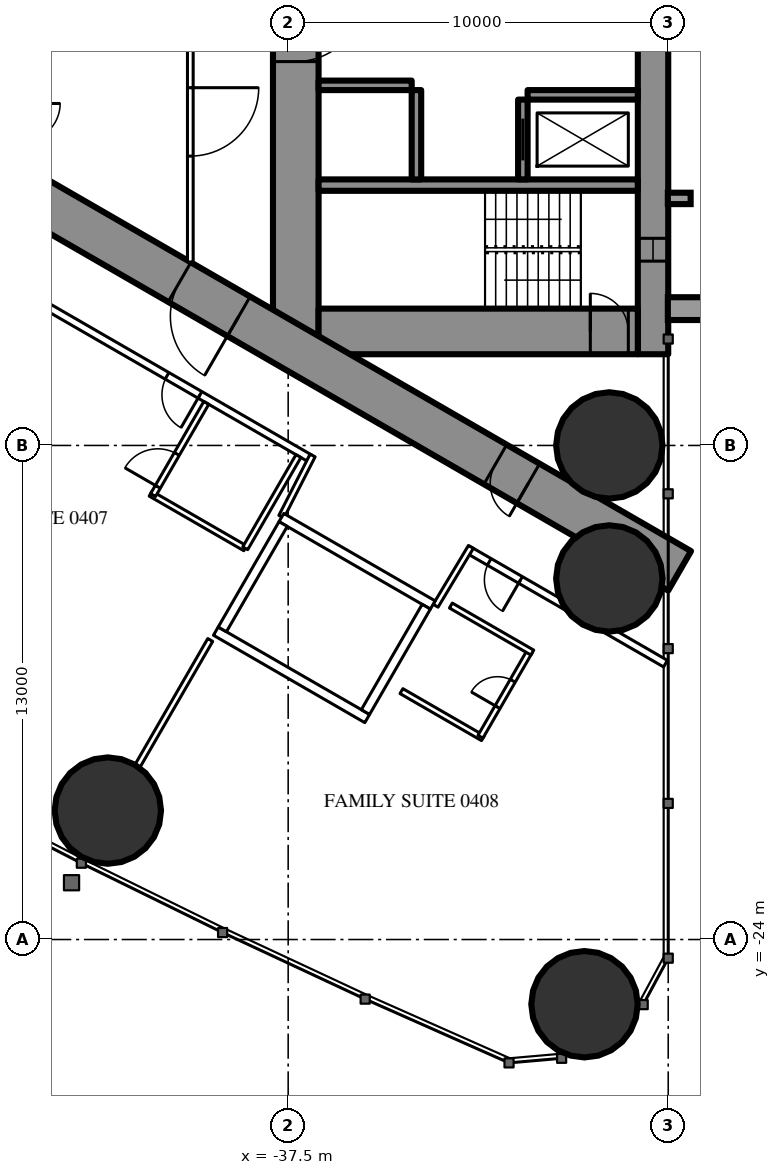
"""IFC4 building model, lengths in metres.
Left out: names, types, materials, properties, quantities, classifications, styles, units other than length and angle.
Written with IfcOpenShell. Run it as: python <this file> out.ifc"""

import sys

from ifc_helpers import new_model, si_unit, direction, frame, frame_2d, origin, origin_2d, place, context, subcontext, project, spatial, rectangle, hollow_circle, extrude, element, fill, save


model = new_model("IFC4")
c1 = context("Model", 3, precision=1e-05, world=origin(), true_north=direction((0.0, 1.0)))
c2 = subcontext(c1, "Body", "Model", "MODEL_VIEW")
j1 = project(units=[si_unit("LENGTHUNIT", "METRE"), si_unit("PLANEANGLEUNIT", "RADIAN")], contexts=[c1])
p1 = place(None, origin())
s1 = spatial("IfcSite", under=j1, at=p1, CompositionType="ELEMENT")
p2 = place(p1, origin())
s2 = spatial("IfcBuilding", under=s1, at=p2, CompositionType="ELEMENT")
p3 = place(p2, frame((0.0, 0.0, 21.5)))
s3 = spatial("IfcBuildingStorey", under=s2, at=p3, CompositionType="ELEMENT", Elevation=21.5)
for number, where, z_axis, x_axis in (
    (1, (-29.703, -25.703, 0.0), (0.0, 0.0, 1.0), (1.0, 0.0, 0.0)),
    (2, (-29.05, -11.0, 0.0), (0.0, 0.0, 1.0), (1.0, 0.0, 0.0)),
    (3, (-29.05, -14.5, 0.0), (0.0, 0.0, 1.0), (1.0, 0.0, 0.0)),
    (4, (-42.245, -20.607, 0.0), (0.0, 0.0, 1.0), (1.0, 0.0, 0.0)),
):
    element("IfcColumn", number, at=place(p3, frame(where, z_axis=z_axis, x_axis=x_axis)), inside=s3, PredefinedType="COLUMN", context=c2, shape_type="SweptSolid", body=[
        extrude(hollow_circle(Radius=1.4, WallThickness=0.12, at=origin_2d()), origin(), (0.0, 0.0, 1.0), 3.5),
    ])
p4 = place(p3, frame((-27.9, 8.6, 0.0), z_axis=(0.0, 0.0, 1.0), x_axis=(0.0, -1.0, 0.0)))
e5 = element("IfcWall", 5, at=p4, inside=s3, PredefinedType="SHEAR", context=c2, shape_type="SweptSolid", body=[
    extrude(rectangle(XDim=17.2, YDim=0.8, at=frame_2d((8.6, 0.0))), origin(), (0.0, 0.0, 1.0), 3.5),
])
p5 = place(p4, frame((2.45, 0.0, 0.6)))
e6 = element("IfcOpeningElement", 6, at=p5, cuts=e5, PredefinedType="OPENING", context=c2, shape_type="SweptSolid", body=[
    extrude(rectangle(XDim=0.6, YDim=2.1, at=frame_2d((0.3, 1.05))), frame((0.0, 0.41, 0.0), z_axis=(0.0, -1.0, 0.0), x_axis=(1.0, 0.0, 0.0)), (0.0, 0.0, 1.0), 0.82),
])
p6 = place(p4, frame((14.15, 0.0, 0.6)))
e7 = element("IfcOpeningElement", 7, at=p6, cuts=e5, PredefinedType="OPENING", context=c2, shape_type="SweptSolid", body=[
    extrude(rectangle(XDim=0.6, YDim=2.1, at=frame_2d((0.3, 1.05))), frame((0.0, 0.41, 0.0), z_axis=(0.0, -1.0, 0.0), x_axis=(1.0, 0.0, 0.0)), (0.0, 0.0, 1.0), 0.82),
])
p7 = place(p3, frame((-37.3, 8.6, 0.0), z_axis=(0.0, 0.0, 1.0), x_axis=(0.0, -1.0, 0.0)))
e8 = element("IfcWall", 8, at=p7, inside=s3, PredefinedType="SHEAR", context=c2, shape_type="SweptSolid", body=[
    extrude(rectangle(XDim=17.2, YDim=1.2, at=frame_2d((8.6, 0.0))), origin(), (0.0, 0.0, 1.0), 3.5),
])
p8 = place(p7, frame((7.7, 0.0, 0.0)))
e9 = element("IfcOpeningElement", 9, at=p8, cuts=e8, PredefinedType="OPENING", context=c2, shape_type="SweptSolid", body=[
    extrude(rectangle(XDim=1.8, YDim=2.2, at=frame_2d((0.9, 1.1))), frame((0.0, 0.61, 0.0), z_axis=(0.0, -1.0, 0.0), x_axis=(1.0, 0.0, 0.0)), (0.0, 0.0, 1.0), 1.22),
])
p9 = place(p3, frame((-28.3, -8.0, 0.0), z_axis=(0.0, 0.0, 1.0), x_axis=(-1.0, 0.0, 0.0)))
e10 = element("IfcWall", 10, at=p9, inside=s3, PredefinedType="SHEAR", context=c2, shape_type="SweptSolid", body=[
    extrude(rectangle(XDim=8.4, YDim=1.2, at=frame_2d((4.2, 0.0))), origin(), (0.0, 0.0, 1.0), 3.5),
])
p10 = place(p9, frame((0.25, 0.0, 0.0)))
e11 = element("IfcOpeningElement", 11, at=p10, cuts=e10, PredefinedType="OPENING", context=c2, shape_type="SweptSolid", body=[
    extrude(rectangle(XDim=1.0, YDim=2.2, at=frame_2d((0.5, 1.1))), frame((0.0, 0.61, 0.0), z_axis=(0.0, -1.0, 0.0), x_axis=(1.0, 0.0, 0.0)), (0.0, 0.0, 1.0), 1.22),
])
p11 = place(p3, frame((-28.3, -4.15, 0.0), z_axis=(0.0, 0.0, 1.0), x_axis=(-1.0, 0.0, 0.0)))
e12 = element("IfcWall", 12, at=p11, inside=s3, PredefinedType="SHEAR", context=c2, shape_type="SweptSolid", body=[
    extrude(rectangle(XDim=8.4, YDim=0.3, at=frame_2d((4.2, 0.0))), origin(), (0.0, 0.0, 1.0), 3.5),
])
p12 = place(p3, frame((-31.325, -1.9, 0.0), z_axis=(0.0, 0.0, 1.0), x_axis=(0.0, -1.0, 0.0)))
e13 = element("IfcWall", 13, at=p12, inside=s3, PredefinedType="SHEAR", context=c2, shape_type="SweptSolid", body=[
    extrude(rectangle(XDim=2.1, YDim=0.25, at=frame_2d((1.05, 0.0))), origin(), (0.0, 0.0, 1.0), 3.5),
])
p13 = place(p12, frame((0.5, 0.0, 0.0)))
e14 = element("IfcOpeningElement", 14, at=p13, cuts=e13, PredefinedType="OPENING", context=c2, shape_type="SweptSolid", body=[
    extrude(rectangle(XDim=1.1, YDim=2.2, at=frame_2d((0.55, 1.1))), frame((0.0, 0.135, 0.0), z_axis=(0.0, -1.0, 0.0), x_axis=(1.0, 0.0, 0.0)), (0.0, 0.0, 1.0), 0.27),
])
p14 = place(p3, frame((-34.125, -1.65, 0.0), z_axis=(0.0, 0.0, 1.0), x_axis=(0.0, -1.0, 0.0)))
e15 = element("IfcWall", 15, at=p14, inside=s3, PredefinedType="SHEAR", context=c2, shape_type="SweptSolid", body=[
    extrude(rectangle(XDim=2.35, YDim=0.25, at=frame_2d((1.175, 0.0))), origin(), (0.0, 0.0, 1.0), 3.5),
])
p15 = place(p3, frame((-28.3, -1.775, 0.0), z_axis=(0.0, 0.0, 1.0), x_axis=(-1.0, 0.0, 0.0)))
e16 = element("IfcWall", 16, at=p15, inside=s3, PredefinedType="SHEAR", context=c2, shape_type="SweptSolid", body=[
    extrude(rectangle(XDim=2.9, YDim=0.25, at=frame_2d((1.45, 0.0))), origin(), (0.0, 0.0, 1.0), 3.5),
])
p16 = place(p3, frame((-34.25, -1.525, 0.0), z_axis=(0.0, 0.0, 1.0), x_axis=(-1.0, 0.0, 0.0)))
e17 = element("IfcWall", 17, at=p16, inside=s3, PredefinedType="SHEAR", context=c2, shape_type="SweptSolid", body=[
    extrude(rectangle(XDim=2.45, YDim=0.25, at=frame_2d((1.225, 0.0))), origin(), (0.0, 0.0, 1.0), 3.5),
])
p17 = place(p3, frame((-27.2, 14.3, 0.0), z_axis=(0.0, 0.0, 1.0), x_axis=(-0.866026593062, -0.499997940104, 0.0)))
e18 = element("IfcWall", 18, at=p17, inside=s3, PredefinedType="SHEAR", context=c2, shape_type="SweptSolid", body=[
    extrude(rectangle(XDim=28.946, YDim=1.2, at=frame_2d((14.473, 0.0))), origin(), (0.0, 0.0, 1.0), 3.5),
])
p18 = place(p17, frame((4.6, 0.0, 0.0)))
e19 = element("IfcOpeningElement", 19, at=p18, cuts=e18, PredefinedType="OPENING", context=c2, shape_type="SweptSolid", body=[
    extrude(rectangle(XDim=1.0, YDim=2.2, at=frame_2d((0.5, 1.1))), frame((0.0, 0.61, 0.0), z_axis=(0.0, -1.0, 0.0), x_axis=(1.0, 0.0, 0.0)), (0.0, 0.0, 1.0), 1.22),
])
p19 = place(p17, frame((13.395, 0.0, 0.0)))
e20 = element("IfcOpeningElement", 20, at=p19, cuts=e18, PredefinedType="OPENING", context=c2, shape_type="SweptSolid", body=[
    extrude(rectangle(XDim=1.8, YDim=2.2, at=frame_2d((0.9, 1.1))), frame((0.0, 0.61, 0.0), z_axis=(0.0, -1.0, 0.0), x_axis=(1.0, 0.0, 0.0)), (0.0, 0.0, 1.0), 1.22),
])
p20 = place(p3, frame((-27.2, -14.3, 0.0), z_axis=(0.0, 0.0, 1.0), x_axis=(-0.866024021859, 0.500002393557, 0.0)))
e21 = element("IfcWall", 21, at=p20, inside=s3, PredefinedType="SHEAR", context=c2, shape_type="SweptSolid", body=[
    extrude(rectangle(XDim=27.907, YDim=1.2, at=frame_2d((13.954, 0.0))), origin(), (0.0, 0.0, 1.0), 3.5),
])
p21 = place(p20, frame((4.6, 0.0, 0.0)))
e22 = element("IfcOpeningElement", 22, at=p21, cuts=e21, PredefinedType="OPENING", context=c2, shape_type="SweptSolid", body=[
    extrude(rectangle(XDim=1.0, YDim=2.2, at=frame_2d((0.5, 1.1))), frame((0.0, 0.61, 0.0), z_axis=(0.0, -1.0, 0.0), x_axis=(1.0, 0.0, 0.0)), (0.0, 0.0, 1.0), 1.22),
])
p22 = place(p20, frame((13.395, 0.0, 0.0)))
e23 = element("IfcOpeningElement", 23, at=p22, cuts=e21, PredefinedType="OPENING", context=c2, shape_type="SweptSolid", body=[
    extrude(rectangle(XDim=1.8, YDim=2.2, at=frame_2d((0.9, 1.1))), frame((0.0, 0.61, 0.0), z_axis=(0.0, -1.0, 0.0), x_axis=(1.0, 0.0, 0.0)), (0.0, 0.0, 1.0), 1.22),
])
p23 = place(p3, frame((-39.551, -16.118, 0.0), z_axis=(0.0, 0.0, 1.0), x_axis=(-0.499986503906, -0.866033195618, 0.0)))
e24 = element("IfcWall", 24, at=p23, inside=s3, PredefinedType="PARTITIONING", context=c2, shape_type="SweptSolid", body=[
    extrude(rectangle(XDim=3.815, YDim=0.15, at=frame_2d((1.907, 0.0))), origin(), (0.0, 0.0, 1.0), 3.25),
])
p24 = place(p3, frame((-27.572, -16.741, 0.0), z_axis=(0.0, 0.0, 1.0), x_axis=(-0.866024464444, 0.500001626982, 0.0)))
e25 = element("IfcWall", 25, at=p24, inside=s3, PredefinedType="PARTITIONING", context=c2, shape_type="SweptSolid", body=[
    extrude(rectangle(XDim=5.955, YDim=0.2, at=frame_2d((2.978, 0.0))), origin(), (0.0, 0.0, 1.0), 3.25),
])
p25 = place(p24, frame((4.405, 0.0, 0.0)))
e26 = element("IfcOpeningElement", 26, at=p25, cuts=e25, PredefinedType="OPENING", context=c2, shape_type="SweptSolid", body=[
    extrude(rectangle(XDim=0.95, YDim=2.2, at=frame_2d((0.475, 1.1))), frame((0.0, 0.11, 0.0), z_axis=(0.0, -1.0, 0.0), x_axis=(1.0, 0.0, 0.0)), (0.0, 0.0, 1.0), 0.22),
])
p26 = place(p3, frame((-36.92, -11.344, 0.0), z_axis=(0.0, 0.0, 1.0), x_axis=(-0.866028313256, 0.499994960614, 0.0)))
e27 = element("IfcWall", 27, at=p26, inside=s3, PredefinedType="PARTITIONING", context=c2, shape_type="SweptSolid", body=[
    extrude(rectangle(XDim=22.568, YDim=0.2, at=frame_2d((11.284, 0.0))), origin(), (0.0, 0.0, 1.0), 3.25),
])
p27 = place(p26, frame((15.03, 0.0, 0.0)))
e28 = element("IfcOpeningElement", 28, at=p27, cuts=e27, PredefinedType="OPENING", context=c2, shape_type="SweptSolid", body=[
    extrude(rectangle(XDim=0.95, YDim=2.2, at=frame_2d((0.475, 1.1))), frame((0.0, 0.11, 0.0), z_axis=(0.0, -1.0, 0.0), x_axis=(1.0, 0.0, 0.0)), (0.0, 0.0, 1.0), 0.22),
])
p28 = place(p26, frame((3.35, 0.0, 0.0)))
e29 = element("IfcOpeningElement", 29, at=p28, cuts=e27, PredefinedType="OPENING", context=c2, shape_type="SweptSolid", body=[
    extrude(rectangle(XDim=1.0, YDim=2.2, at=frame_2d((0.5, 1.1))), frame((0.0, 0.11, 0.0), z_axis=(0.0, -1.0, 0.0), x_axis=(1.0, 0.0, 0.0)), (0.0, 0.0, 1.0), 0.22),
])
p29 = place(p3, frame((-36.857, -11.265, 0.0), z_axis=(0.0, 0.0, 1.0), x_axis=(-0.454225294761, -0.890886851176, 0.0)))
e30 = element("IfcWall", 30, at=p29, inside=s3, PredefinedType="PARTITIONING", context=c2, shape_type="SweptSolid", body=[
    extrude(rectangle(XDim=1.807, YDim=0.15, at=frame_2d((0.904, 0.0))), origin(), (0.0, 0.0, 1.0), 3.25),
])
p30 = place(p3, frame((-33.621, -15.218, 0.0), z_axis=(0.0, 0.0, 1.0), x_axis=(0.514336634837, 0.857588377991, 0.0)))
e31 = element("IfcWall", 31, at=p30, inside=s3, PredefinedType="PARTITIONING", context=c2, shape_type="SweptSolid", body=[
    extrude(rectangle(XDim=1.805, YDim=0.15, at=frame_2d((0.903, 0.0))), origin(), (0.0, 0.0, 1.0), 3.25),
])
p31 = place(p3, frame((-38.63, -13.705, 0.0), z_axis=(0.0, 0.0, 1.0), x_axis=(-0.866018712932, 0.500011588718, 0.0)))
e32 = element("IfcWall", 32, at=p31, inside=s3, PredefinedType="PARTITIONING", context=c2, shape_type="SweptSolid", body=[
    extrude(rectangle(XDim=2.875, YDim=0.15, at=frame_2d((1.438, 0.0))), origin(), (0.0, 0.0, 1.0), 3.25),
])
p32 = place(p3, frame((-39.655, -9.88, 0.0), z_axis=(0.0, 0.0, 1.0), x_axis=(-0.500049511043, -0.865996816683, 0.0)))
e33 = element("IfcWall", 33, at=p32, inside=s3, PredefinedType="PARTITIONING", context=c2, shape_type="SweptSolid", body=[
    extrude(rectangle(XDim=2.8, YDim=0.15, at=frame_2d((1.4, 0.0))), origin(), (0.0, 0.0, 1.0), 3.25),
])
p33 = place(p32, frame((1.55, 0.0, 0.0)))
e34 = element("IfcOpeningElement", 34, at=p33, cuts=e33, PredefinedType="OPENING", context=c2, shape_type="SweptSolid", body=[
    extrude(rectangle(XDim=1.0, YDim=2.2, at=frame_2d((0.5, 1.1))), frame((0.0, 0.085, 0.0), z_axis=(0.0, -1.0, 0.0), x_axis=(1.0, 0.0, 0.0)), (0.0, 0.0, 1.0), 0.17),
])
p34 = place(p3, frame((-37.23, -11.281, 0.0), z_axis=(0.0, 0.0, 1.0), x_axis=(-0.500049511043, -0.865996816683, 0.0)))
e35 = element("IfcWall", 35, at=p34, inside=s3, PredefinedType="PARTITIONING", context=c2, shape_type="SweptSolid", body=[
    extrude(rectangle(XDim=2.8, YDim=0.15, at=frame_2d((1.4, 0.0))), origin(), (0.0, 0.0, 1.0), 3.25),
])
p35 = place(p3, frame((-32.376, -18.702, 0.0), z_axis=(0.0, 0.0, 1.0), x_axis=(-0.866006523861, 0.500032699561, 0.0)))
e36 = element("IfcWall", 36, at=p35, inside=s3, PredefinedType="PARTITIONING", context=c2, shape_type="SweptSolid", body=[
    extrude(rectangle(XDim=2.475, YDim=0.15, at=frame_2d((1.237, 0.0))), origin(), (0.0, 0.0, 1.0), 3.25),
])
p36 = place(p3, frame((-31.141, -16.413, 0.0), z_axis=(0.0, 0.0, 1.0), x_axis=(-0.500006934395, -0.866021400173, 0.0)))
e37 = element("IfcWall", 37, at=p36, inside=s3, PredefinedType="PARTITIONING", context=c2, shape_type="SweptSolid", body=[
    extrude(rectangle(XDim=2.6, YDim=0.15, at=frame_2d((1.3, 0.0))), origin(), (0.0, 0.0, 1.0), 3.25),
])
p37 = place(p36, frame((0.9, 0.0, 0.0)))
e38 = element("IfcOpeningElement", 38, at=p37, cuts=e37, PredefinedType="OPENING", context=c2, shape_type="SweptSolid", body=[
    extrude(rectangle(XDim=0.8, YDim=2.2, at=frame_2d((0.4, 1.1))), frame((0.0, 0.085, 0.0), z_axis=(0.0, -1.0, 0.0), x_axis=(1.0, 0.0, 0.0)), (0.0, 0.0, 1.0), 0.17),
])
p38 = place(p3, frame((-31.076, -16.45, 0.0), z_axis=(0.0, 0.0, 1.0), x_axis=(-0.866073894602, 0.499916002032, 0.0)))
e39 = element("IfcWall", 39, at=p38, inside=s3, PredefinedType="PARTITIONING", context=c2, shape_type="SweptSolid", body=[
    extrude(rectangle(XDim=2.475, YDim=0.15, at=frame_2d((1.238, 0.0))), origin(), (0.0, 0.0, 1.0), 3.25),
])
p39 = place(p3, frame((-40.075, 1.2, 0.0), z_axis=(0.0, 0.0, 1.0), x_axis=(0.0, -1.0, 0.0)))
e40 = element("IfcWall", 40, at=p39, inside=s3, PredefinedType="PARTITIONING", context=c2, shape_type="SweptSolid", body=[
    extrude(rectangle(XDim=7.374, YDim=0.15, at=frame_2d((3.687, 0.0))), origin(), (0.0, 0.0, 1.0), 3.25),
])
p40 = place(p39, frame((2.787, 0.0, 0.0)))
e41 = element("IfcOpeningElement", 41, at=p40, cuts=e40, PredefinedType="OPENING", context=c2, shape_type="SweptSolid", body=[
    extrude(rectangle(XDim=1.8, YDim=2.2, at=frame_2d((0.9, 1.1))), frame((0.0, 0.085, 0.0), z_axis=(0.0, -1.0, 0.0), x_axis=(1.0, 0.0, 0.0)), (0.0, 0.0, 1.0), 0.17),
])
p41 = place(p3, frame((-33.696, -15.197, 0.0), z_axis=(0.0, 0.0, 1.0), x_axis=(-0.865976953817, 0.500083908417, 0.0)))
e42 = element("IfcWall", 42, at=p41, inside=s3, PredefinedType="PARTITIONING", context=c2, shape_type="SweptSolid", body=[
    extrude(rectangle(XDim=4.599, YDim=0.25, at=frame_2d((2.3, 0.0))), origin(), (0.0, 0.0, 1.0), 3.25),
])
p42 = place(p3, frame((-35.42, -18.186, 0.0), z_axis=(0.0, 0.0, 1.0), x_axis=(-0.865990227814, 0.50006092162, 0.0)))
e43 = element("IfcWall", 43, at=p42, inside=s3, PredefinedType="PARTITIONING", context=c2, shape_type="SweptSolid", body=[
    extrude(rectangle(XDim=4.6, YDim=0.25, at=frame_2d((2.3, 0.0))), origin(), (0.0, 0.0, 1.0), 3.25),
])
p43 = place(p3, frame((-33.866, -15.243, 0.0), z_axis=(0.0, 0.0, 1.0), x_axis=(-0.499929347863, -0.866066190972, 0.0)))
e44 = element("IfcWall", 44, at=p43, inside=s3, PredefinedType="PARTITIONING", context=c2, shape_type="SweptSolid", body=[
    extrude(rectangle(XDim=3.201, YDim=0.25, at=frame_2d((1.6, 0.0))), origin(), (0.0, 0.0, 1.0), 3.25),
])
p44 = place(p3, frame((-37.633, -13.068, 0.0), z_axis=(0.0, 0.0, 1.0), x_axis=(-0.499872130319, -0.866099216793, 0.0)))
e45 = element("IfcWall", 45, at=p44, inside=s3, PredefinedType="PARTITIONING", context=c2, shape_type="SweptSolid", body=[
    extrude(rectangle(XDim=3.2, YDim=0.25, at=frame_2d((1.6, 0.0))), origin(), (0.0, 0.0, 1.0), 3.25),
])
p45 = place(p33, origin())
e46 = element("IfcDoor", 46, at=p45, inside=s3, OperationType="SINGLE_SWING_RIGHT", PredefinedType="DOOR", context=c2, shape_type="SweptSolid", body=[
    extrude(rectangle(XDim=1.0, YDim=2.2, at=frame_2d((0.5, 1.1))), frame((0.0, 0.025, 0.0), z_axis=(0.0, -1.0, 0.0), x_axis=(1.0, 0.0, 0.0)), (0.0, 0.0, 1.0), 0.05),
])
fill(e34, e46)
p46 = place(p28, origin())
e47 = element("IfcDoor", 47, at=p46, inside=s3, OperationType="SINGLE_SWING_LEFT", PredefinedType="DOOR", context=c2, shape_type="SweptSolid", body=[
    extrude(rectangle(XDim=1.0, YDim=2.2, at=frame_2d((0.5, 1.1))), frame((0.0, 0.025, 0.0), z_axis=(0.0, -1.0, 0.0), x_axis=(1.0, 0.0, 0.0)), (0.0, 0.0, 1.0), 0.05),
])
fill(e29, e47)
p47 = place(p37, origin())
e48 = element("IfcDoor", 48, at=p47, inside=s3, OperationType="SINGLE_SWING_RIGHT", PredefinedType="DOOR", context=c2, shape_type="SweptSolid", body=[
    extrude(rectangle(XDim=0.8, YDim=2.2, at=frame_2d((0.4, 1.1))), frame((0.0, 0.025, 0.0), z_axis=(0.0, -1.0, 0.0), x_axis=(1.0, 0.0, 0.0)), (0.0, 0.0, 1.0), 0.05),
])
fill(e38, e48)
p48 = place(p25, origin())
e49 = element("IfcDoor", 49, at=p48, inside=s3, OperationType="SINGLE_SWING_LEFT", PredefinedType="DOOR", context=c2, shape_type="SweptSolid", body=[
    extrude(rectangle(XDim=0.95, YDim=2.2, at=frame_2d((0.475, 1.1))), frame((0.0, 0.025, 0.0), z_axis=(0.0, -1.0, 0.0), x_axis=(1.0, 0.0, 0.0)), (0.0, 0.0, 1.0), 0.05),
])
fill(e26, e49)
p49 = place(p40, origin())
e50 = element("IfcDoor", 50, at=p49, inside=s3, OperationType="DOUBLE_DOOR_SINGLE_SWING", PredefinedType="DOOR", context=c2, shape_type="SweptSolid", body=[
    extrude(rectangle(XDim=1.8, YDim=2.2, at=frame_2d((0.9, 1.1))), frame((0.0, 0.025, 0.0), z_axis=(0.0, -1.0, 0.0), x_axis=(1.0, 0.0, 0.0)), (0.0, 0.0, 1.0), 0.05),
])
fill(e41, e50)
p50 = place(p21, origin())
e51 = element("IfcDoor", 51, at=p50, inside=s3, OperationType="SINGLE_SWING_LEFT", PredefinedType="DOOR", context=c2, shape_type="SweptSolid", body=[
    extrude(rectangle(XDim=1.0, YDim=2.2, at=frame_2d((0.5, 1.1))), frame((0.0, 0.025, 0.0), z_axis=(0.0, -1.0, 0.0), x_axis=(1.0, 0.0, 0.0)), (0.0, 0.0, 1.0), 0.05),
])
fill(e22, e51)
p51 = place(p22, origin())
e52 = element("IfcDoor", 52, at=p51, inside=s3, OperationType="DOUBLE_DOOR_SINGLE_SWING", PredefinedType="DOOR", context=c2, shape_type="SweptSolid", body=[
    extrude(rectangle(XDim=1.8, YDim=2.2, at=frame_2d((0.9, 1.1))), frame((0.0, 0.025, 0.0), z_axis=(0.0, -1.0, 0.0), x_axis=(1.0, 0.0, 0.0)), (0.0, 0.0, 1.0), 0.05),
])
fill(e23, e52)
p52 = place(p8, origin())
e53 = element("IfcDoor", 53, at=p52, inside=s3, OperationType="DOUBLE_DOOR_SINGLE_SWING", PredefinedType="DOOR", context=c2, shape_type="SweptSolid", body=[
    extrude(rectangle(XDim=1.8, YDim=2.2, at=frame_2d((0.9, 1.1))), frame((0.0, 0.025, 0.0), z_axis=(0.0, -1.0, 0.0), x_axis=(1.0, 0.0, 0.0)), (0.0, 0.0, 1.0), 0.05),
])
fill(e9, e53)
p53 = place(p10, origin())
e54 = element("IfcDoor", 54, at=p53, inside=s3, OperationType="SINGLE_SWING_RIGHT", PredefinedType="DOOR", context=c2, shape_type="SweptSolid", body=[
    extrude(rectangle(XDim=1.0, YDim=2.2, at=frame_2d((0.5, 1.1))), frame((0.0, 0.025, 0.0), z_axis=(0.0, -1.0, 0.0), x_axis=(1.0, 0.0, 0.0)), (0.0, 0.0, 1.0), 0.05),
])
fill(e11, e54)
p54 = place(p13, origin())
e55 = element("IfcDoor", 55, at=p54, inside=s3, OperationType="SLIDING_TO_LEFT", PredefinedType="USERDEFINED", context=c2, shape_type="SweptSolid", body=[
    extrude(rectangle(XDim=1.1, YDim=2.2, at=frame_2d((0.55, 1.1))), frame((0.0, 0.025, 0.0), z_axis=(0.0, -1.0, 0.0), x_axis=(1.0, 0.0, 0.0)), (0.0, 0.0, 1.0), 0.05),
])
fill(e14, e55)
p55 = place(p6, origin())
e56 = element("IfcWindow", 56, at=p55, inside=s3, PartitioningType="SINGLE_PANEL", PredefinedType="WINDOW", context=c2, shape_type="SweptSolid", body=[
    extrude(rectangle(XDim=0.6, YDim=2.1, at=frame_2d((0.3, 1.05))), frame((0.0, 0.03, 0.0), z_axis=(0.0, -1.0, 0.0), x_axis=(1.0, 0.0, 0.0)), (0.0, 0.0, 1.0), 0.06),
])
fill(e7, e56)
save(model, sys.argv[1])
